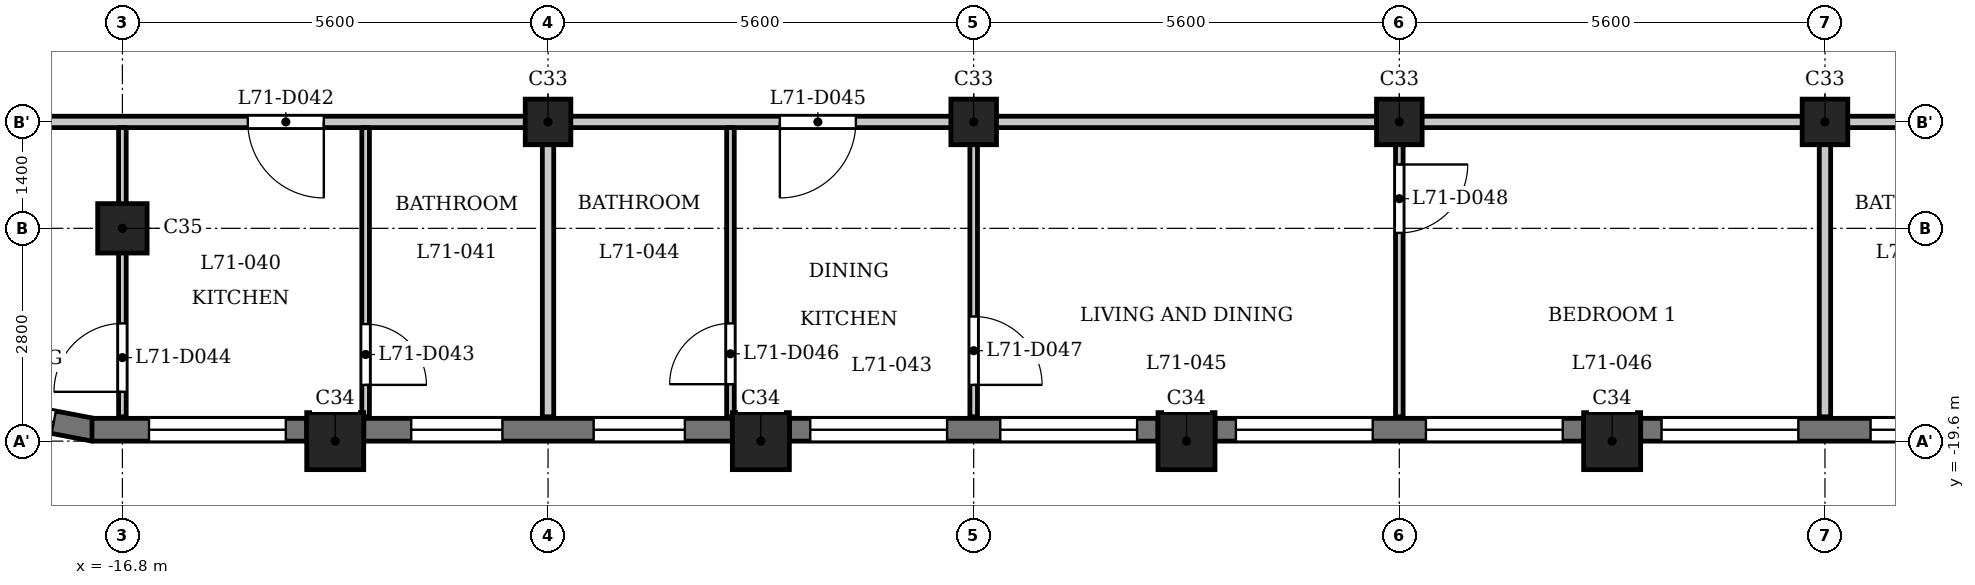
"""IFC4 building model, lengths in metres.
Left out: names, types, materials, properties, quantities, classifications, styles, units other than length and angle.
Written with IfcOpenShell. Run it as: python <this file> out.ifc"""

import sys

from ifc_helpers import new_model, si_unit, direction, frame, frame_2d, origin, origin_2d, place, context, subcontext, project, spatial, rectangle, extrude, element, fill, save


model = new_model("IFC4")
c1 = context("Model", 3, precision=1e-05, world=origin(), true_north=direction((0.0, 1.0)))
c2 = subcontext(c1, "Body", "Model", "MODEL_VIEW")
j1 = project(units=[si_unit("LENGTHUNIT", "METRE"), si_unit("PLANEANGLEUNIT", "RADIAN")], contexts=[c1])
p1 = place(None, origin())
s1 = spatial("IfcSite", under=j1, at=p1, CompositionType="ELEMENT")
p2 = place(p1, origin())
s2 = spatial("IfcBuilding", under=s1, at=p2, CompositionType="ELEMENT")
p3 = place(p2, frame((0.0, 0.0, 273.2)))
s3 = spatial("IfcBuildingStorey", under=s2, at=p3, CompositionType="ELEMENT", Elevation=273.2)
for number, where, z_axis, x_axis in (
    (1, (-14.0, -19.6, 0.0), (0.0, 0.0, 1.0), (1.0, 0.0, 0.0)),
    (2, (-8.4, -19.6, 0.0), (0.0, 0.0, 1.0), (1.0, 0.0, 0.0)),
    (3, (-2.8, -19.6, 0.0), (0.0, 0.0, 1.0), (1.0, 0.0, 0.0)),
    (4, (2.8, -19.6, 0.0), (0.0, 0.0, 1.0), (1.0, 0.0, 0.0)),
):
    element("IfcColumn", number, at=place(p3, frame(where, z_axis=z_axis, x_axis=x_axis)), inside=s3, PredefinedType="COLUMN", context=c2, shape_type="SweptSolid", body=[
        extrude(rectangle(XDim=0.75, YDim=0.75, at=origin_2d()), origin(), (0.0, 0.0, 1.0), 3.5),
    ])
p4 = place(p3, frame((-16.8, -16.8, 0.0), z_axis=(0.0, 0.0, 1.0), x_axis=(1.0, 0.0, 0.0)))
e5 = element("IfcColumn", 5, at=p4, inside=s3, PredefinedType="COLUMN", context=c2, shape_type="SweptSolid", body=[
    extrude(rectangle(XDim=0.65, YDim=0.65, at=origin_2d()), origin(), (0.0, 0.0, 1.0), 3.5),
])
for number, where, z_axis, x_axis in (
    (6, (-11.2, -15.4, 0.0), (0.0, 0.0, 1.0), (1.0, 0.0, 0.0)),
    (7, (-5.6, -15.4, 0.0), (0.0, 0.0, 1.0), (1.0, 0.0, 0.0)),
    (8, (0.0, -15.4, 0.0), (0.0, 0.0, 1.0), (1.0, 0.0, 0.0)),
    (9, (5.6, -15.4, 0.0), (0.0, 0.0, 1.0), (1.0, 0.0, 0.0)),
):
    element("IfcColumn", number, at=place(p3, frame(where, z_axis=z_axis, x_axis=x_axis)), inside=s3, PredefinedType="COLUMN", context=c2, shape_type="SweptSolid", body=[
        extrude(rectangle(XDim=0.6, YDim=0.6, at=origin_2d()), origin(), (0.0, 0.0, 1.0), 3.5),
    ])
p5 = place(p3, frame((-19.02, -19.1, 0.0), z_axis=(0.0, 0.0, 1.0), x_axis=(0.982284001233, -0.187398348234, 0.0)))
e10 = element("IfcWall", 10, at=p5, inside=s3, PredefinedType="SOLIDWALL", context=c2, shape_type="SweptSolid", body=[
    extrude(rectangle(XDim=1.881, YDim=0.3, at=frame_2d((0.941, 0.0))), origin(), (0.0, 0.0, 1.0), 2.55),
])
p6 = place(p5, frame((0.541, 0.0, 0.6)))
e11 = element("IfcOpeningElement", 11, at=p6, cuts=e10, PredefinedType="OPENING", context=c2, shape_type="SweptSolid", body=[
    extrude(rectangle(XDim=0.8, YDim=1.55, at=frame_2d((0.4, 0.775))), frame((0.0, 0.16, 0.0), z_axis=(0.0, -1.0, 0.0), x_axis=(1.0, 0.0, 0.0)), (0.0, 0.0, 1.0), 0.32),
])
p7 = place(p3, frame((-17.2, -19.45, 0.0), z_axis=(0.0, 0.0, 1.0), x_axis=(1.0, 0.0, 0.0)))
e12 = element("IfcWall", 12, at=p7, inside=s3, PredefinedType="SOLIDWALL", context=c2, shape_type="SweptSolid", body=[
    extrude(rectangle(XDim=2.825, YDim=0.3, at=frame_2d((1.413, 0.0))), origin(), (0.0, 0.0, 1.0), 2.55),
])
p8 = place(p7, frame((0.75, 0.0, 0.9)))
e13 = element("IfcOpeningElement", 13, at=p8, cuts=e12, PredefinedType="OPENING", context=c2, shape_type="SweptSolid", body=[
    extrude(rectangle(XDim=1.8, YDim=1.25, at=frame_2d((0.9, 0.625))), frame((0.0, 0.16, 0.0), z_axis=(0.0, -1.0, 0.0), x_axis=(1.0, 0.0, 0.0)), (0.0, 0.0, 1.0), 0.32),
])
p9 = place(p3, frame((-13.625, -19.45, 0.0), z_axis=(0.0, 0.0, 1.0), x_axis=(1.0, 0.0, 0.0)))
e14 = element("IfcWall", 14, at=p9, inside=s3, PredefinedType="SOLIDWALL", context=c2, shape_type="SweptSolid", body=[
    extrude(rectangle(XDim=4.85, YDim=0.3, at=frame_2d((2.425, 0.0))), origin(), (0.0, 0.0, 1.0), 2.55),
])
p10 = place(p9, frame((0.625, 0.0, 0.6)))
e15 = element("IfcOpeningElement", 15, at=p10, cuts=e14, PredefinedType="OPENING", context=c2, shape_type="SweptSolid", body=[
    extrude(rectangle(XDim=1.2, YDim=1.55, at=frame_2d((0.6, 0.775))), frame((0.0, 0.16, 0.0), z_axis=(0.0, -1.0, 0.0), x_axis=(1.0, 0.0, 0.0)), (0.0, 0.0, 1.0), 0.32),
])
p11 = place(p9, frame((3.025, 0.0, 0.6)))
e16 = element("IfcOpeningElement", 16, at=p11, cuts=e14, PredefinedType="OPENING", context=c2, shape_type="SweptSolid", body=[
    extrude(rectangle(XDim=1.2, YDim=1.55, at=frame_2d((0.6, 0.775))), frame((0.0, 0.16, 0.0), z_axis=(0.0, -1.0, 0.0), x_axis=(1.0, 0.0, 0.0)), (0.0, 0.0, 1.0), 0.32),
])
p12 = place(p3, frame((-8.025, -19.45, 0.0), z_axis=(0.0, 0.0, 1.0), x_axis=(1.0, 0.0, 0.0)))
e17 = element("IfcWall", 17, at=p12, inside=s3, PredefinedType="SOLIDWALL", context=c2, shape_type="SweptSolid", body=[
    extrude(rectangle(XDim=4.85, YDim=0.3, at=frame_2d((2.425, 0.0))), origin(), (0.0, 0.0, 1.0), 2.55),
])
p13 = place(p12, frame((0.275, 0.0, 0.9)))
e18 = element("IfcOpeningElement", 18, at=p13, cuts=e17, PredefinedType="OPENING", context=c2, shape_type="SweptSolid", body=[
    extrude(rectangle(XDim=1.8, YDim=1.25, at=frame_2d((0.9, 0.625))), frame((0.0, 0.16, 0.0), z_axis=(0.0, -1.0, 0.0), x_axis=(1.0, 0.0, 0.0)), (0.0, 0.0, 1.0), 0.32),
])
p14 = place(p12, frame((2.775, 0.0, 0.9)))
e19 = element("IfcOpeningElement", 19, at=p14, cuts=e17, PredefinedType="OPENING", context=c2, shape_type="SweptSolid", body=[
    extrude(rectangle(XDim=1.8, YDim=1.25, at=frame_2d((0.9, 0.625))), frame((0.0, 0.16, 0.0), z_axis=(0.0, -1.0, 0.0), x_axis=(1.0, 0.0, 0.0)), (0.0, 0.0, 1.0), 0.32),
])
p15 = place(p3, frame((-2.425, -19.45, 0.0), z_axis=(0.0, 0.0, 1.0), x_axis=(1.0, 0.0, 0.0)))
e20 = element("IfcWall", 20, at=p15, inside=s3, PredefinedType="SOLIDWALL", context=c2, shape_type="SweptSolid", body=[
    extrude(rectangle(XDim=4.85, YDim=0.3, at=frame_2d((2.425, 0.0))), origin(), (0.0, 0.0, 1.0), 2.55),
])
p16 = place(p15, frame((0.275, 0.0, 0.9)))
e21 = element("IfcOpeningElement", 21, at=p16, cuts=e20, PredefinedType="OPENING", context=c2, shape_type="SweptSolid", body=[
    extrude(rectangle(XDim=1.8, YDim=1.25, at=frame_2d((0.9, 0.625))), frame((0.0, 0.16, 0.0), z_axis=(0.0, -1.0, 0.0), x_axis=(1.0, 0.0, 0.0)), (0.0, 0.0, 1.0), 0.32),
])
p17 = place(p15, frame((2.775, 0.0, 0.9)))
e22 = element("IfcOpeningElement", 22, at=p17, cuts=e20, PredefinedType="OPENING", context=c2, shape_type="SweptSolid", body=[
    extrude(rectangle(XDim=1.8, YDim=1.25, at=frame_2d((0.9, 0.625))), frame((0.0, 0.16, 0.0), z_axis=(0.0, -1.0, 0.0), x_axis=(1.0, 0.0, 0.0)), (0.0, 0.0, 1.0), 0.32),
])
p18 = place(p3, frame((3.175, -19.45, 0.0), z_axis=(0.0, 0.0, 1.0), x_axis=(1.0, 0.0, 0.0)))
e23 = element("IfcWall", 23, at=p18, inside=s3, PredefinedType="SOLIDWALL", context=c2, shape_type="SweptSolid", body=[
    extrude(rectangle(XDim=4.85, YDim=0.3, at=frame_2d((2.425, 0.0))), origin(), (0.0, 0.0, 1.0), 2.55),
])
p19 = place(p18, frame((0.275, 0.0, 0.9)))
e24 = element("IfcOpeningElement", 24, at=p19, cuts=e23, PredefinedType="OPENING", context=c2, shape_type="SweptSolid", body=[
    extrude(rectangle(XDim=1.8, YDim=1.25, at=frame_2d((0.9, 0.625))), frame((0.0, 0.16, 0.0), z_axis=(0.0, -1.0, 0.0), x_axis=(1.0, 0.0, 0.0)), (0.0, 0.0, 1.0), 0.32),
])
p20 = place(p18, frame((3.025, 0.0, 0.6)))
e25 = element("IfcOpeningElement", 25, at=p20, cuts=e23, PredefinedType="OPENING", context=c2, shape_type="SweptSolid", body=[
    extrude(rectangle(XDim=1.2, YDim=1.55, at=frame_2d((0.6, 0.775))), frame((0.0, 0.16, 0.0), z_axis=(0.0, -1.0, 0.0), x_axis=(1.0, 0.0, 0.0)), (0.0, 0.0, 1.0), 0.32),
])
p21 = place(p3, frame((-23.322, -15.4, 0.0), z_axis=(0.0, 0.0, 1.0), x_axis=(1.0, 0.0, 0.0)))
e26 = element("IfcWall", 26, at=p21, inside=s3, PredefinedType="PARTITIONING", context=c2, shape_type="SweptSolid", body=[
    extrude(rectangle(XDim=46.872, YDim=0.15, at=frame_2d((23.436, 0.0))), origin(), (0.0, 0.0, 1.0), 3.2),
])
p22 = place(p21, frame((8.172, 0.0, 0.0)))
e27 = element("IfcOpeningElement", 27, at=p22, cuts=e26, PredefinedType="OPENING", context=c2, shape_type="SweptSolid", body=[
    extrude(rectangle(XDim=1.0, YDim=2.1, at=frame_2d((0.5, 1.05))), frame((0.0, 0.085, 0.0), z_axis=(0.0, -1.0, 0.0), x_axis=(1.0, 0.0, 0.0)), (0.0, 0.0, 1.0), 0.17),
])
p23 = place(p21, frame((15.172, 0.0, 0.0)))
e28 = element("IfcOpeningElement", 28, at=p23, cuts=e26, PredefinedType="OPENING", context=c2, shape_type="SweptSolid", body=[
    extrude(rectangle(XDim=1.0, YDim=2.1, at=frame_2d((0.5, 1.05))), frame((0.0, 0.085, 0.0), z_axis=(0.0, -1.0, 0.0), x_axis=(1.0, 0.0, 0.0)), (0.0, 0.0, 1.0), 0.17),
])
p24 = place(p21, frame((31.972, 0.0, 0.0)))
e29 = element("IfcOpeningElement", 29, at=p24, cuts=e26, PredefinedType="OPENING", context=c2, shape_type="SweptSolid", body=[
    extrude(rectangle(XDim=1.0, YDim=2.1, at=frame_2d((0.5, 1.05))), frame((0.0, 0.085, 0.0), z_axis=(0.0, -1.0, 0.0), x_axis=(1.0, 0.0, 0.0)), (0.0, 0.0, 1.0), 0.17),
])
p25 = place(p3, frame((-16.8, -19.28, 0.0), z_axis=(0.0, 0.0, 1.0), x_axis=(0.0, 1.0, 0.0)))
e30 = element("IfcWall", 30, at=p25, inside=s3, PredefinedType="PARTITIONING", context=c2, shape_type="SweptSolid", body=[
    extrude(rectangle(XDim=3.805, YDim=0.1, at=frame_2d((1.902, 0.0))), origin(), (0.0, 0.0, 1.0), 3.2),
])
p26 = place(p25, frame((0.329, 0.0, 0.0)))
e31 = element("IfcOpeningElement", 31, at=p26, cuts=e30, PredefinedType="OPENING", context=c2, shape_type="SweptSolid", body=[
    extrude(rectangle(XDim=0.9, YDim=2.1, at=frame_2d((0.45, 1.05))), frame((0.0, 0.06, 0.0), z_axis=(0.0, -1.0, 0.0), x_axis=(1.0, 0.0, 0.0)), (0.0, 0.0, 1.0), 0.12),
])
p27 = place(p3, frame((-13.6, -19.28, 0.0), z_axis=(0.0, 0.0, 1.0), x_axis=(0.0, 1.0, 0.0)))
e32 = element("IfcWall", 32, at=p27, inside=s3, PredefinedType="PARTITIONING", context=c2, shape_type="SweptSolid", body=[
    extrude(rectangle(XDim=3.805, YDim=0.1, at=frame_2d((1.902, 0.0))), origin(), (0.0, 0.0, 1.0), 3.2),
])
p28 = place(p27, frame((0.42, 0.0, 0.0)))
e33 = element("IfcOpeningElement", 33, at=p28, cuts=e32, PredefinedType="OPENING", context=c2, shape_type="SweptSolid", body=[
    extrude(rectangle(XDim=0.8, YDim=2.1, at=frame_2d((0.4, 1.05))), frame((0.0, 0.06, 0.0), z_axis=(0.0, -1.0, 0.0), x_axis=(1.0, 0.0, 0.0)), (0.0, 0.0, 1.0), 0.12),
])
p29 = place(p3, frame((-11.2, -19.28, 0.0), z_axis=(0.0, 0.0, 1.0), x_axis=(0.0, 1.0, 0.0)))
e34 = element("IfcWall", 34, at=p29, inside=s3, PredefinedType="PARTITIONING", context=c2, shape_type="SweptSolid", body=[
    extrude(rectangle(XDim=3.805, YDim=0.15, at=frame_2d((1.902, 0.0))), origin(), (0.0, 0.0, 1.0), 3.2),
])
p30 = place(p3, frame((-8.8, -19.28, 0.0), z_axis=(0.0, 0.0, 1.0), x_axis=(0.0, 1.0, 0.0)))
e35 = element("IfcWall", 35, at=p30, inside=s3, PredefinedType="PARTITIONING", context=c2, shape_type="SweptSolid", body=[
    extrude(rectangle(XDim=3.805, YDim=0.1, at=frame_2d((1.902, 0.0))), origin(), (0.0, 0.0, 1.0), 3.2),
])
p31 = place(p30, frame((0.429, 0.0, 0.0)))
e36 = element("IfcOpeningElement", 36, at=p31, cuts=e35, PredefinedType="OPENING", context=c2, shape_type="SweptSolid", body=[
    extrude(rectangle(XDim=0.8, YDim=2.1, at=frame_2d((0.4, 1.05))), frame((0.0, 0.06, 0.0), z_axis=(0.0, -1.0, 0.0), x_axis=(1.0, 0.0, 0.0)), (0.0, 0.0, 1.0), 0.12),
])
p32 = place(p3, frame((-5.6, -19.28, 0.0), z_axis=(0.0, 0.0, 1.0), x_axis=(0.0, 1.0, 0.0)))
e37 = element("IfcWall", 37, at=p32, inside=s3, PredefinedType="PARTITIONING", context=c2, shape_type="SweptSolid", body=[
    extrude(rectangle(XDim=3.805, YDim=0.1, at=frame_2d((1.902, 0.0))), origin(), (0.0, 0.0, 1.0), 3.2),
])
p33 = place(p32, frame((0.42, 0.0, 0.0)))
e38 = element("IfcOpeningElement", 38, at=p33, cuts=e37, PredefinedType="OPENING", context=c2, shape_type="SweptSolid", body=[
    extrude(rectangle(XDim=0.9, YDim=2.1, at=frame_2d((0.45, 1.05))), frame((0.0, 0.06, 0.0), z_axis=(0.0, -1.0, 0.0), x_axis=(1.0, 0.0, 0.0)), (0.0, 0.0, 1.0), 0.12),
])
p34 = place(p3, frame((0.0, -19.28, 0.0), z_axis=(0.0, 0.0, 1.0), x_axis=(0.0, 1.0, 0.0)))
e39 = element("IfcWall", 39, at=p34, inside=s3, PredefinedType="PARTITIONING", context=c2, shape_type="SweptSolid", body=[
    extrude(rectangle(XDim=3.805, YDim=0.1, at=frame_2d((1.902, 0.0))), origin(), (0.0, 0.0, 1.0), 3.2),
])
p35 = place(p34, frame((2.42, 0.0, 0.0)))
e40 = element("IfcOpeningElement", 40, at=p35, cuts=e39, PredefinedType="OPENING", context=c2, shape_type="SweptSolid", body=[
    extrude(rectangle(XDim=0.9, YDim=2.1, at=frame_2d((0.45, 1.05))), frame((0.0, 0.06, 0.0), z_axis=(0.0, -1.0, 0.0), x_axis=(1.0, 0.0, 0.0)), (0.0, 0.0, 1.0), 0.12),
])
p36 = place(p3, frame((5.6, -19.28, 0.0), z_axis=(0.0, 0.0, 1.0), x_axis=(0.0, 1.0, 0.0)))
e41 = element("IfcWall", 41, at=p36, inside=s3, PredefinedType="PARTITIONING", context=c2, shape_type="SweptSolid", body=[
    extrude(rectangle(XDim=3.805, YDim=0.15, at=frame_2d((1.902, 0.0))), origin(), (0.0, 0.0, 1.0), 3.2),
])
p37 = place(p22, origin())
e42 = element("IfcDoor", 42, at=p37, inside=s3, OperationType="SINGLE_SWING_RIGHT", PredefinedType="DOOR", context=c2, shape_type="SweptSolid", body=[
    extrude(rectangle(XDim=1.0, YDim=2.1, at=frame_2d((0.5, 1.05))), frame((0.0, 0.025, 0.0), z_axis=(0.0, -1.0, 0.0), x_axis=(1.0, 0.0, 0.0)), (0.0, 0.0, 1.0), 0.05),
])
fill(e27, e42)
p38 = place(p28, origin())
e43 = element("IfcDoor", 43, at=p38, inside=s3, OperationType="SINGLE_SWING_LEFT", PredefinedType="DOOR", context=c2, shape_type="SweptSolid", body=[
    extrude(rectangle(XDim=0.8, YDim=2.1, at=frame_2d((0.4, 1.05))), frame((0.0, 0.025, 0.0), z_axis=(0.0, -1.0, 0.0), x_axis=(1.0, 0.0, 0.0)), (0.0, 0.0, 1.0), 0.05),
])
fill(e33, e43)
p39 = place(p26, origin())
e44 = element("IfcDoor", 44, at=p39, inside=s3, OperationType="SINGLE_SWING_RIGHT", PredefinedType="DOOR", context=c2, shape_type="SweptSolid", body=[
    extrude(rectangle(XDim=0.9, YDim=2.1, at=frame_2d((0.45, 1.05))), frame((0.0, 0.025, 0.0), z_axis=(0.0, -1.0, 0.0), x_axis=(1.0, 0.0, 0.0)), (0.0, 0.0, 1.0), 0.05),
])
fill(e31, e44)
p40 = place(p23, origin())
e45 = element("IfcDoor", 45, at=p40, inside=s3, OperationType="SINGLE_SWING_LEFT", PredefinedType="DOOR", context=c2, shape_type="SweptSolid", body=[
    extrude(rectangle(XDim=1.0, YDim=2.1, at=frame_2d((0.5, 1.05))), frame((0.0, 0.025, 0.0), z_axis=(0.0, -1.0, 0.0), x_axis=(1.0, 0.0, 0.0)), (0.0, 0.0, 1.0), 0.05),
])
fill(e28, e45)
p41 = place(p31, origin())
e46 = element("IfcDoor", 46, at=p41, inside=s3, OperationType="SINGLE_SWING_RIGHT", PredefinedType="DOOR", context=c2, shape_type="SweptSolid", body=[
    extrude(rectangle(XDim=0.8, YDim=2.1, at=frame_2d((0.4, 1.05))), frame((0.0, 0.025, 0.0), z_axis=(0.0, -1.0, 0.0), x_axis=(1.0, 0.0, 0.0)), (0.0, 0.0, 1.0), 0.05),
])
fill(e36, e46)
p42 = place(p33, origin())
e47 = element("IfcDoor", 47, at=p42, inside=s3, OperationType="SINGLE_SWING_LEFT", PredefinedType="DOOR", context=c2, shape_type="SweptSolid", body=[
    extrude(rectangle(XDim=0.9, YDim=2.1, at=frame_2d((0.45, 1.05))), frame((0.0, 0.025, 0.0), z_axis=(0.0, -1.0, 0.0), x_axis=(1.0, 0.0, 0.0)), (0.0, 0.0, 1.0), 0.05),
])
fill(e38, e47)
p43 = place(p35, origin())
e48 = element("IfcDoor", 48, at=p43, inside=s3, OperationType="SINGLE_SWING_RIGHT", PredefinedType="DOOR", context=c2, shape_type="SweptSolid", body=[
    extrude(rectangle(XDim=0.9, YDim=2.1, at=frame_2d((0.45, 1.05))), frame((0.0, 0.025, 0.0), z_axis=(0.0, -1.0, 0.0), x_axis=(1.0, 0.0, 0.0)), (0.0, 0.0, 1.0), 0.05),
])
fill(e40, e48)
p44 = place(p6, origin())
e49 = element("IfcWindow", 49, at=p44, inside=s3, PartitioningType="SINGLE_PANEL", PredefinedType="WINDOW", context=c2, shape_type="SweptSolid", body=[
    extrude(rectangle(XDim=0.8, YDim=1.55, at=frame_2d((0.4, 0.775))), frame((0.0, 0.03, 0.0), z_axis=(0.0, -1.0, 0.0), x_axis=(1.0, 0.0, 0.0)), (0.0, 0.0, 1.0), 0.06),
])
fill(e11, e49)
p45 = place(p8, origin())
e50 = element("IfcWindow", 50, at=p45, inside=s3, PartitioningType="SINGLE_PANEL", PredefinedType="WINDOW", context=c2, shape_type="SweptSolid", body=[
    extrude(rectangle(XDim=1.8, YDim=1.25, at=frame_2d((0.9, 0.625))), frame((0.0, 0.03, 0.0), z_axis=(0.0, -1.0, 0.0), x_axis=(1.0, 0.0, 0.0)), (0.0, 0.0, 1.0), 0.06),
])
fill(e13, e50)
p46 = place(p10, origin())
e51 = element("IfcWindow", 51, at=p46, inside=s3, PartitioningType="SINGLE_PANEL", PredefinedType="WINDOW", context=c2, shape_type="SweptSolid", body=[
    extrude(rectangle(XDim=1.2, YDim=1.55, at=frame_2d((0.6, 0.775))), frame((0.0, 0.03, 0.0), z_axis=(0.0, -1.0, 0.0), x_axis=(1.0, 0.0, 0.0)), (0.0, 0.0, 1.0), 0.06),
])
fill(e15, e51)
p47 = place(p11, origin())
e52 = element("IfcWindow", 52, at=p47, inside=s3, PartitioningType="SINGLE_PANEL", PredefinedType="WINDOW", context=c2, shape_type="SweptSolid", body=[
    extrude(rectangle(XDim=1.2, YDim=1.55, at=frame_2d((0.6, 0.775))), frame((0.0, 0.03, 0.0), z_axis=(0.0, -1.0, 0.0), x_axis=(1.0, 0.0, 0.0)), (0.0, 0.0, 1.0), 0.06),
])
fill(e16, e52)
p48 = place(p13, origin())
e53 = element("IfcWindow", 53, at=p48, inside=s3, PartitioningType="SINGLE_PANEL", PredefinedType="WINDOW", context=c2, shape_type="SweptSolid", body=[
    extrude(rectangle(XDim=1.8, YDim=1.25, at=frame_2d((0.9, 0.625))), frame((0.0, 0.03, 0.0), z_axis=(0.0, -1.0, 0.0), x_axis=(1.0, 0.0, 0.0)), (0.0, 0.0, 1.0), 0.06),
])
fill(e18, e53)
p49 = place(p14, origin())
e54 = element("IfcWindow", 54, at=p49, inside=s3, PartitioningType="SINGLE_PANEL", PredefinedType="WINDOW", context=c2, shape_type="SweptSolid", body=[
    extrude(rectangle(XDim=1.8, YDim=1.25, at=frame_2d((0.9, 0.625))), frame((0.0, 0.03, 0.0), z_axis=(0.0, -1.0, 0.0), x_axis=(1.0, 0.0, 0.0)), (0.0, 0.0, 1.0), 0.06),
])
fill(e19, e54)
p50 = place(p16, origin())
e55 = element("IfcWindow", 55, at=p50, inside=s3, PartitioningType="SINGLE_PANEL", PredefinedType="WINDOW", context=c2, shape_type="SweptSolid", body=[
    extrude(rectangle(XDim=1.8, YDim=1.25, at=frame_2d((0.9, 0.625))), frame((0.0, 0.03, 0.0), z_axis=(0.0, -1.0, 0.0), x_axis=(1.0, 0.0, 0.0)), (0.0, 0.0, 1.0), 0.06),
])
fill(e21, e55)
p51 = place(p17, origin())
e56 = element("IfcWindow", 56, at=p51, inside=s3, PartitioningType="SINGLE_PANEL", PredefinedType="WINDOW", context=c2, shape_type="SweptSolid", body=[
    extrude(rectangle(XDim=1.8, YDim=1.25, at=frame_2d((0.9, 0.625))), frame((0.0, 0.03, 0.0), z_axis=(0.0, -1.0, 0.0), x_axis=(1.0, 0.0, 0.0)), (0.0, 0.0, 1.0), 0.06),
])
fill(e22, e56)
p52 = place(p19, origin())
e57 = element("IfcWindow", 57, at=p52, inside=s3, PartitioningType="SINGLE_PANEL", PredefinedType="WINDOW", context=c2, shape_type="SweptSolid", body=[
    extrude(rectangle(XDim=1.8, YDim=1.25, at=frame_2d((0.9, 0.625))), frame((0.0, 0.03, 0.0), z_axis=(0.0, -1.0, 0.0), x_axis=(1.0, 0.0, 0.0)), (0.0, 0.0, 1.0), 0.06),
])
fill(e24, e57)
p53 = place(p20, origin())
e58 = element("IfcWindow", 58, at=p53, inside=s3, PartitioningType="SINGLE_PANEL", PredefinedType="WINDOW", context=c2, shape_type="SweptSolid", body=[
    extrude(rectangle(XDim=1.2, YDim=1.55, at=frame_2d((0.6, 0.775))), frame((0.0, 0.03, 0.0), z_axis=(0.0, -1.0, 0.0), x_axis=(1.0, 0.0, 0.0)), (0.0, 0.0, 1.0), 0.06),
])
fill(e25, e58)
save(model, sys.argv[1])
